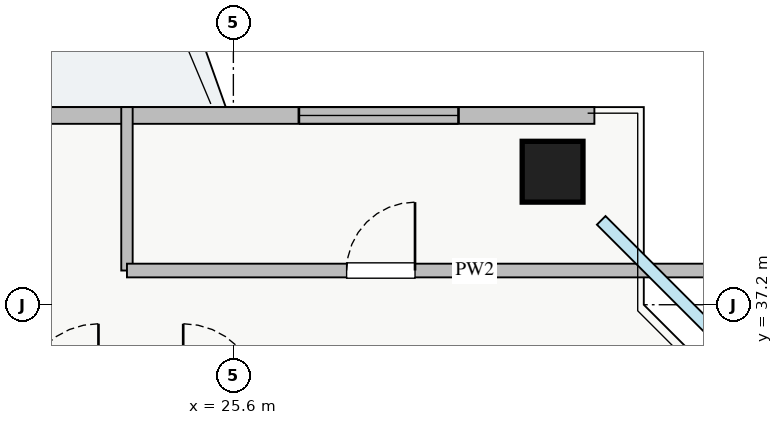
"""IFC4 building model, lengths in metres.
Left out: names, types, materials, properties, quantities, classifications, styles, units other than length and angle.
Written with IfcOpenShell. Run it as: python <this file> out.ifc"""

import sys

from ifc_helpers import new_model, si_unit, direction, frame, frame_2d, origin, origin_2d, place, context, subcontext, project, spatial, rectangle, extrude, source, transform, mapped, element, fill, save


model = new_model("IFC4")
c1 = context("Model", 3, precision=1e-05, world=origin(), true_north=direction((0.0, 1.0)))
c2 = subcontext(c1, "Body", "Model", "MODEL_VIEW")
j1 = project(units=[si_unit("LENGTHUNIT", "METRE"), si_unit("PLANEANGLEUNIT", "RADIAN")], contexts=[c1])
p1 = place(None, origin())
s1 = spatial("IfcSite", under=j1, at=p1, CompositionType="ELEMENT")
p2 = place(p1, origin())
s2 = spatial("IfcBuilding", under=s1, at=p2, CompositionType="ELEMENT")
p3 = place(p2, frame((0.0, 0.0, 226.25)))
s3 = spatial("IfcBuildingStorey", under=s2, at=p3, CompositionType="ELEMENT", Elevation=226.25)
m1 = source(origin(), c2, "Body", "SweptSolid", [
    extrude(rectangle(XDim=0.8, YDim=0.8, at=origin_2d()), origin(), (0.0, 0.0, 1.0), 3.25),
])
p4 = place(p3, frame((29.8, 38.95, 0.0), z_axis=(0.0, 0.0, 1.0), x_axis=(1.0, 0.0, 0.0)))
e1 = element("IfcColumn", 1, at=p4, inside=s3, PredefinedType="COLUMN", context=c2, shape_type="MappedRepresentation", body=[
    mapped(m1, transform((0.0, 0.0, 0.0), x_axis=(1.0, 0.0, 0.0), y_axis=(0.0, 1.0, 0.0), z_axis=(0.0, 0.0, 1.0), scale=1.0)),
])
p5 = place(p3, frame((7.65, 39.69, 0.0), z_axis=(0.0, 0.0, 1.0), x_axis=(1.0, 0.0, 0.0)))
e2 = element("IfcWall", 2, at=p5, inside=s3, PredefinedType="STANDARD", context=c2, shape_type="SweptSolid", body=[
    extrude(rectangle(XDim=22.7, YDim=0.22, at=frame_2d((11.35, 0.0))), origin(), (0.0, 0.0, 1.0), 2.61),
])
p6 = place(p5, frame((12.2, 0.0, 0.0)))
e3 = element("IfcOpeningElement", 3, at=p6, cuts=e2, PredefinedType="OPENING", context=c2, shape_type="SweptSolid", body=[
    extrude(rectangle(XDim=1.2, YDim=2.1, at=frame_2d((0.6, 1.05))), frame((0.0, 0.12, 0.0), z_axis=(0.0, -1.0, 0.0), x_axis=(1.0, 0.0, 0.0)), (0.0, 0.0, 1.0), 0.24),
])
p7 = place(p5, frame((1.637, 0.0, 0.9)))
e4 = element("IfcOpeningElement", 4, at=p7, cuts=e2, PredefinedType="OPENING", context=c2, shape_type="SweptSolid", body=[
    extrude(rectangle(XDim=2.4, YDim=1.48, at=frame_2d((1.2, 0.74))), frame((0.0, 0.12, 0.0), z_axis=(0.0, -1.0, 0.0), x_axis=(1.0, 0.0, 0.0)), (0.0, 0.0, 1.0), 0.24),
])
p8 = place(p5, frame((7.612, 0.0, 0.9)))
e5 = element("IfcOpeningElement", 5, at=p8, cuts=e2, PredefinedType="OPENING", context=c2, shape_type="SweptSolid", body=[
    extrude(rectangle(XDim=1.8, YDim=1.45, at=frame_2d((0.9, 0.725))), frame((0.0, 0.12, 0.0), z_axis=(0.0, -1.0, 0.0), x_axis=(1.0, 0.0, 0.0)), (0.0, 0.0, 1.0), 0.24),
])
p9 = place(p5, frame((18.812, 0.0, 0.9)))
e6 = element("IfcOpeningElement", 6, at=p9, cuts=e2, PredefinedType="OPENING", context=c2, shape_type="SweptSolid", body=[
    extrude(rectangle(XDim=2.1, YDim=1.48, at=frame_2d((1.05, 0.74))), frame((0.0, 0.12, 0.0), z_axis=(0.0, -1.0, 0.0), x_axis=(1.0, 0.0, 0.0)), (0.0, 0.0, 1.0), 0.24),
])
p10 = place(p3, frame((24.2, 37.65, 0.0), z_axis=(0.0, 0.0, 1.0), x_axis=(0.0, 1.0, 0.0)))
e7 = element("IfcWall", 7, at=p10, inside=s3, PredefinedType="PARTITIONING", context=c2, shape_type="SweptSolid", body=[
    extrude(rectangle(XDim=2.15, YDim=0.15, at=frame_2d((1.075, 0.0))), origin(), (0.0, 0.0, 1.0), 3.07),
])
p11 = place(p3, frame((24.2, 37.65, 0.0), z_axis=(0.0, 0.0, 1.0), x_axis=(1.0, 0.0, 0.0)))
e8 = element("IfcWall", 8, at=p11, inside=s3, PredefinedType="PARTITIONING", context=c2, shape_type="SweptSolid", body=[
    extrude(rectangle(XDim=8.25, YDim=0.18, at=frame_2d((4.125, 0.0))), origin(), (0.0, 0.0, 1.0), 3.07),
])
p12 = place(p11, frame((2.89, 0.0, 0.0)))
e9 = element("IfcOpeningElement", 9, at=p12, cuts=e8, PredefinedType="OPENING", context=c2, shape_type="SweptSolid", body=[
    extrude(rectangle(XDim=0.9, YDim=2.05, at=frame_2d((0.45, 1.025))), frame((0.0, 0.1, 0.0), z_axis=(0.0, -1.0, 0.0), x_axis=(1.0, 0.0, 0.0)), (0.0, 0.0, 1.0), 0.2),
])
m2 = source(origin(), c2, "Body", "SweptSolid", [
    extrude(rectangle(XDim=2.1, YDim=1.48, at=frame_2d((1.05, 0.74))), frame((0.0, 0.03, 0.0), z_axis=(0.0, -1.0, 0.0), x_axis=(1.0, 0.0, 0.0)), (0.0, 0.0, 1.0), 0.06),
])
p13 = place(p9, origin())
e10 = element("IfcWindow", 10, at=p13, inside=s3, PartitioningType="TRIPLE_PANEL_VERTICAL", PredefinedType="WINDOW", context=c2, shape_type="MappedRepresentation", body=[
    mapped(m2, transform((0.0, 0.0, 0.0), x_axis=(1.0, 0.0, 0.0), y_axis=(0.0, 1.0, 0.0), z_axis=(0.0, 0.0, 1.0), scale=1.0)),
])
fill(e6, e10)
m3 = source(origin(), c2, "Body", "SweptSolid", [
    extrude(rectangle(XDim=0.9, YDim=2.05, at=frame_2d((0.45, 1.025))), frame((0.0, 0.025, 0.0), z_axis=(0.0, -1.0, 0.0), x_axis=(1.0, 0.0, 0.0)), (0.0, 0.0, 1.0), 0.05),
])
p14 = place(p12, origin())
e11 = element("IfcDoor", 11, at=p14, inside=s3, OperationType="SINGLE_SWING_RIGHT", PredefinedType="DOOR", context=c2, shape_type="MappedRepresentation", body=[
    mapped(m3, transform((0.0, 0.0, 0.0), x_axis=(1.0, 0.0, 0.0), y_axis=(0.0, 1.0, 0.0), z_axis=(0.0, 0.0, 1.0), scale=1.0)),
])
fill(e9, e11)
save(model, sys.argv[1])
